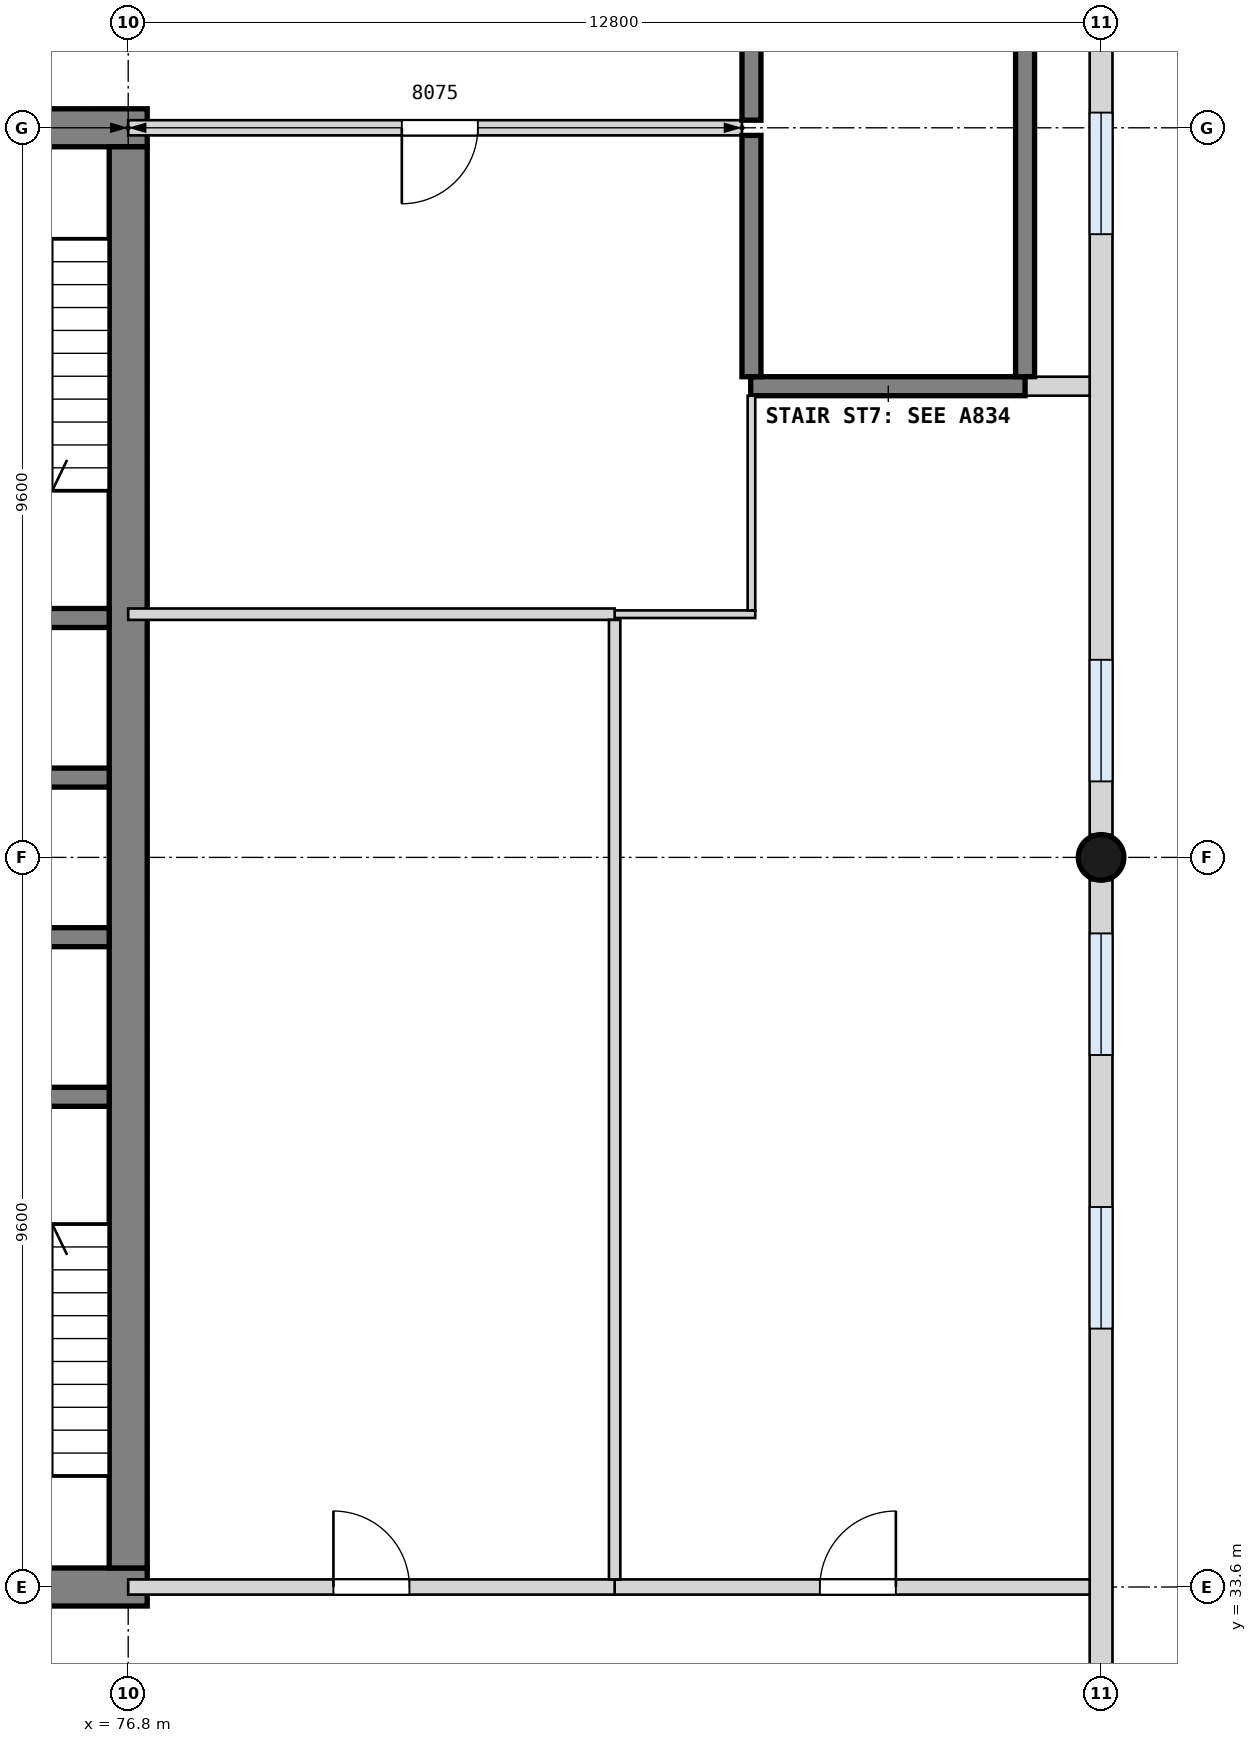
"""IFC4 building model, lengths in metres.
Left out: names, types, materials, properties, quantities, classifications, styles, units other than length and angle.
Written with IfcOpenShell. Run it as: python <this file> out.ifc"""

import sys

from ifc_helpers import new_model, si_unit, direction, frame, frame_2d, origin, origin_2d, place, context, subcontext, project, spatial, rectangle, circle, extrude, element, fill, save


model = new_model("IFC4")
c1 = context("Model", 3, precision=1e-05, world=origin(), true_north=direction((0.0, 1.0)))
c2 = subcontext(c1, "Body", "Model", "MODEL_VIEW")
j1 = project(units=[si_unit("LENGTHUNIT", "METRE"), si_unit("PLANEANGLEUNIT", "RADIAN")], contexts=[c1])
p1 = place(None, origin())
s1 = spatial("IfcSite", under=j1, at=p1, CompositionType="ELEMENT")
p2 = place(p1, origin())
s2 = spatial("IfcBuilding", under=s1, at=p2, CompositionType="ELEMENT")
p3 = place(p2, frame((0.0, 0.0, 4.2)))
s3 = spatial("IfcBuildingStorey", under=s2, at=p3, CompositionType="ELEMENT", Elevation=4.2)
p4 = place(p3, frame((63.75, 52.8, 0.0), z_axis=(0.0, 0.0, 1.0), x_axis=(1.0, 0.0, 0.0)))
e1 = element("IfcWall", 1, at=p4, inside=s3, PredefinedType="SHEAR", context=c2, shape_type="SweptSolid", body=[
    extrude(rectangle(XDim=13.3, YDim=0.5, at=frame_2d((6.65, 0.0))), origin(), (0.0, 0.0, 1.0), 4.2),
])
p5 = place(p4, frame((6.65, 0.0, 0.0)))
e2 = element("IfcOpeningElement", 2, at=p5, cuts=e1, PredefinedType="OPENING", context=c2, shape_type="SweptSolid", body=[
    extrude(rectangle(XDim=2.0, YDim=2.1, at=frame_2d((1.0, 1.05))), frame((0.0, 0.26, 0.0), z_axis=(0.0, -1.0, 0.0), x_axis=(1.0, 0.0, 0.0)), (0.0, 0.0, 1.0), 0.52),
])
p6 = place(p3, frame((63.75, 33.6, 0.0), z_axis=(0.0, 0.0, 1.0), x_axis=(1.0, 0.0, 0.0)))
e3 = element("IfcWall", 3, at=p6, inside=s3, PredefinedType="SHEAR", context=c2, shape_type="SweptSolid", body=[
    extrude(rectangle(XDim=13.3, YDim=0.5, at=frame_2d((6.65, 0.0))), origin(), (0.0, 0.0, 1.0), 4.2),
])
p7 = place(p6, frame((6.65, 0.0, 0.0)))
e4 = element("IfcOpeningElement", 4, at=p7, cuts=e3, PredefinedType="OPENING", context=c2, shape_type="SweptSolid", body=[
    extrude(rectangle(XDim=2.0, YDim=2.1, at=frame_2d((1.0, 1.05))), frame((0.0, 0.26, 0.0), z_axis=(0.0, -1.0, 0.0), x_axis=(1.0, 0.0, 0.0)), (0.0, 0.0, 1.0), 0.52),
])
p8 = place(p3, frame((76.8, 33.85, 0.0), z_axis=(0.0, 0.0, 1.0), x_axis=(0.0, 1.0, 0.0)))
e5 = element("IfcWall", 5, at=p8, inside=s3, PredefinedType="SHEAR", context=c2, shape_type="SweptSolid", body=[
    extrude(rectangle(XDim=18.7, YDim=0.5, at=frame_2d((9.35, 0.0))), origin(), (0.0, 0.0, 1.0), 4.2),
])
p9 = place(p3, frame((89.6, 43.2, 0.0), z_axis=(0.0, 0.0, 1.0), x_axis=(1.0, 0.0, 0.0)))
e6 = element("IfcColumn", 6, at=p9, inside=s3, PredefinedType="COLUMN", context=c2, shape_type="SweptSolid", body=[
    extrude(circle(Radius=0.3, at=origin_2d()), origin(), (0.0, 0.0, 1.0), 4.2),
])
p10 = place(p3, frame((89.6, 29.1, 0.0), z_axis=(0.0, 0.0, 1.0), x_axis=(0.0, 1.0, 0.0)))
e7 = element("IfcWall", 7, at=p10, inside=s3, PredefinedType="SOLIDWALL", context=c2, shape_type="SweptSolid", body=[
    extrude(rectangle(XDim=13.8, YDim=0.3, at=frame_2d((6.9, 0.0))), origin(), (0.0, 0.0, 1.0), 2.9),
])
p11 = place(p10, frame((0.7, 0.0, 1.0)))
e8 = element("IfcOpeningElement", 8, at=p11, cuts=e7, PredefinedType="OPENING", context=c2, shape_type="SweptSolid", body=[
    extrude(rectangle(XDim=1.6, YDim=1.8, at=frame_2d((0.8, 0.9))), frame((0.0, 0.16, 0.0), z_axis=(0.0, -1.0, 0.0), x_axis=(1.0, 0.0, 0.0)), (0.0, 0.0, 1.0), 0.32),
])
p12 = place(p10, frame((7.9, 0.0, 1.0)))
e9 = element("IfcOpeningElement", 9, at=p12, cuts=e7, PredefinedType="OPENING", context=c2, shape_type="SweptSolid", body=[
    extrude(rectangle(XDim=1.6, YDim=1.8, at=frame_2d((0.8, 0.9))), frame((0.0, 0.16, 0.0), z_axis=(0.0, -1.0, 0.0), x_axis=(1.0, 0.0, 0.0)), (0.0, 0.0, 1.0), 0.32),
])
p13 = place(p10, frame((11.5, 0.0, 1.0)))
e10 = element("IfcOpeningElement", 10, at=p13, cuts=e7, PredefinedType="OPENING", context=c2, shape_type="SweptSolid", body=[
    extrude(rectangle(XDim=1.6, YDim=1.8, at=frame_2d((0.8, 0.9))), frame((0.0, 0.16, 0.0), z_axis=(0.0, -1.0, 0.0), x_axis=(1.0, 0.0, 0.0)), (0.0, 0.0, 1.0), 0.32),
])
p14 = place(p3, frame((89.6, 43.5, 0.0), z_axis=(0.0, 0.0, 1.0), x_axis=(0.0, 1.0, 0.0)))
e11 = element("IfcWall", 11, at=p14, inside=s3, PredefinedType="SOLIDWALL", context=c2, shape_type="SweptSolid", body=[
    extrude(rectangle(XDim=13.8, YDim=0.3, at=frame_2d((6.9, 0.0))), origin(), (0.0, 0.0, 1.0), 2.9),
])
p15 = place(p14, frame((0.7, 0.0, 1.0)))
e12 = element("IfcOpeningElement", 12, at=p15, cuts=e11, PredefinedType="OPENING", context=c2, shape_type="SweptSolid", body=[
    extrude(rectangle(XDim=1.6, YDim=1.8, at=frame_2d((0.8, 0.9))), frame((0.0, 0.16, 0.0), z_axis=(0.0, -1.0, 0.0), x_axis=(1.0, 0.0, 0.0)), (0.0, 0.0, 1.0), 0.32),
])
p16 = place(p14, frame((7.9, 0.0, 1.0)))
e13 = element("IfcOpeningElement", 13, at=p16, cuts=e11, PredefinedType="OPENING", context=c2, shape_type="SweptSolid", body=[
    extrude(rectangle(XDim=1.6, YDim=1.8, at=frame_2d((0.8, 0.9))), frame((0.0, 0.16, 0.0), z_axis=(0.0, -1.0, 0.0), x_axis=(1.0, 0.0, 0.0)), (0.0, 0.0, 1.0), 0.32),
])
p17 = place(p14, frame((11.5, 0.0, 1.0)))
e14 = element("IfcOpeningElement", 14, at=p17, cuts=e11, PredefinedType="OPENING", context=c2, shape_type="SweptSolid", body=[
    extrude(rectangle(XDim=1.6, YDim=1.8, at=frame_2d((0.8, 0.9))), frame((0.0, 0.16, 0.0), z_axis=(0.0, -1.0, 0.0), x_axis=(1.0, 0.0, 0.0)), (0.0, 0.0, 1.0), 0.32),
])
for number, where, z_axis, x_axis in (
    (15, (76.55, 40.05, 0.0), (0.0, 0.0, 1.0), (-1.0, 0.0, 0.0)),
    (16, (76.55, 42.15, 0.0), (0.0, 0.0, 1.0), (-1.0, 0.0, 0.0)),
    (17, (76.55, 44.25, 0.0), (0.0, 0.0, 1.0), (-1.0, 0.0, 0.0)),
    (18, (76.55, 46.35, 0.0), (0.0, 0.0, 1.0), (-1.0, 0.0, 0.0)),
):
    element("IfcWall", number, at=place(p3, frame(where, z_axis=z_axis, x_axis=x_axis)), inside=s3, PredefinedType="SOLIDWALL", context=c2, shape_type="SweptSolid", body=[
        extrude(rectangle(XDim=3.475, YDim=0.25, at=frame_2d((1.738, 0.0))), origin(), (0.0, 0.0, 1.0), 3.9),
    ])
p18 = place(p3, frame((89.45, 33.6, 0.0), z_axis=(0.0, 0.0, 1.0), x_axis=(-1.0, 0.0, 0.0)))
e19 = element("IfcWall", 19, at=p18, inside=s3, PredefinedType="PARTITIONING", context=c2, shape_type="SweptSolid", body=[
    extrude(rectangle(XDim=6.25, YDim=0.2, at=frame_2d((3.125, 0.0))), origin(), (0.0, 0.0, 1.0), 3.9),
])
p19 = place(p18, frame((2.55, 0.0, 0.0)))
e20 = element("IfcOpeningElement", 20, at=p19, cuts=e19, PredefinedType="OPENING", context=c2, shape_type="SweptSolid", body=[
    extrude(rectangle(XDim=1.0, YDim=2.1, at=frame_2d((0.5, 1.05))), frame((0.0, 0.11, 0.0), z_axis=(0.0, -1.0, 0.0), x_axis=(1.0, 0.0, 0.0)), (0.0, 0.0, 1.0), 0.22),
])
p20 = place(p3, frame((83.2, 33.6, 0.0), z_axis=(0.0, 0.0, 1.0), x_axis=(-1.0, 0.0, 0.0)))
e21 = element("IfcWall", 21, at=p20, inside=s3, PredefinedType="PARTITIONING", context=c2, shape_type="SweptSolid", body=[
    extrude(rectangle(XDim=6.4, YDim=0.2, at=frame_2d((3.2, 0.0))), origin(), (0.0, 0.0, 1.0), 3.9),
])
p21 = place(p20, frame((2.7, 0.0, 0.0)))
e22 = element("IfcOpeningElement", 22, at=p21, cuts=e21, PredefinedType="OPENING", context=c2, shape_type="SweptSolid", body=[
    extrude(rectangle(XDim=1.0, YDim=2.1, at=frame_2d((0.5, 1.05))), frame((0.0, 0.11, 0.0), z_axis=(0.0, -1.0, 0.0), x_axis=(1.0, 0.0, 0.0)), (0.0, 0.0, 1.0), 0.22),
])
p22 = place(p3, frame((85.05, 46.4, 0.0), z_axis=(0.0, 0.0, 1.0), x_axis=(-1.0, 0.0, 0.0)))
e23 = element("IfcWall", 23, at=p22, inside=s3, PredefinedType="PARTITIONING", context=c2, shape_type="SweptSolid", body=[
    extrude(rectangle(XDim=1.85, YDim=0.1, at=frame_2d((0.925, 0.0))), origin(), (0.0, 0.0, 1.0), 3.9),
])
p23 = place(p3, frame((83.2, 46.4, 0.0), z_axis=(0.0, 0.0, 1.0), x_axis=(-1.0, 0.0, 0.0)))
e24 = element("IfcWall", 24, at=p23, inside=s3, PredefinedType="PARTITIONING", context=c2, shape_type="SweptSolid", body=[
    extrude(rectangle(XDim=6.4, YDim=0.15, at=frame_2d((3.2, 0.0))), origin(), (0.0, 0.0, 1.0), 3.9),
])
p24 = place(p3, frame((89.45, 49.4, 0.0), z_axis=(0.0, 0.0, 1.0), x_axis=(-1.0, 0.0, 0.0)))
e25 = element("IfcWall", 25, at=p24, inside=s3, PredefinedType="PARTITIONING", context=c2, shape_type="SweptSolid", body=[
    extrude(rectangle(XDim=0.85, YDim=0.25, at=frame_2d((0.425, 0.0))), origin(), (0.0, 0.0, 1.0), 3.9),
])
p25 = place(p3, frame((88.6, 49.4, 0.0), z_axis=(0.0, 0.0, 1.0), x_axis=(-1.0, 0.0, 0.0)))
e26 = element("IfcWall", 26, at=p25, inside=s3, PredefinedType="SHEAR", context=c2, shape_type="SweptSolid", body=[
    extrude(rectangle(XDim=3.61, YDim=0.25, at=frame_2d((1.805, 0.0))), origin(), (0.0, 0.0, 1.0), 3.9),
])
p26 = place(p3, frame((84.875, 52.8, 0.0), z_axis=(0.0, 0.0, 1.0), x_axis=(-1.0, 0.0, 0.0)))
e27 = element("IfcWall", 27, at=p26, inside=s3, PredefinedType="PARTITIONING", context=c2, shape_type="SweptSolid", body=[
    extrude(rectangle(XDim=8.075, YDim=0.2, at=frame_2d((4.038, 0.0))), origin(), (0.0, 0.0, 1.0), 3.9),
])
p27 = place(p26, frame((3.475, 0.0, 0.0)))
e28 = element("IfcOpeningElement", 28, at=p27, cuts=e27, PredefinedType="OPENING", context=c2, shape_type="SweptSolid", body=[
    extrude(rectangle(XDim=1.0, YDim=2.1, at=frame_2d((0.5, 1.05))), frame((0.0, 0.11, 0.0), z_axis=(0.0, -1.0, 0.0), x_axis=(1.0, 0.0, 0.0)), (0.0, 0.0, 1.0), 0.22),
])
p28 = place(p3, frame((88.6, 49.525, 0.0), z_axis=(0.0, 0.0, 1.0), x_axis=(0.0, 1.0, 0.0)))
e29 = element("IfcWall", 29, at=p28, inside=s3, PredefinedType="SHEAR", context=c2, shape_type="SweptSolid", body=[
    extrude(rectangle(XDim=5.75, YDim=0.25, at=frame_2d((2.875, 0.0))), origin(), (0.0, 0.0, 1.0), 3.9),
])
p29 = place(p3, frame((85.0, 46.45, 0.0), z_axis=(0.0, 0.0, 1.0), x_axis=(0.0, 1.0, 0.0)))
e30 = element("IfcWall", 30, at=p29, inside=s3, PredefinedType="PARTITIONING", context=c2, shape_type="SweptSolid", body=[
    extrude(rectangle(XDim=2.825, YDim=0.1, at=frame_2d((1.413, 0.0))), origin(), (0.0, 0.0, 1.0), 3.9),
])
p30 = place(p3, frame((85.0, 49.525, 0.0), z_axis=(0.0, 0.0, 1.0), x_axis=(0.0, 1.0, 0.0)))
e31 = element("IfcWall", 31, at=p30, inside=s3, PredefinedType="SHEAR", context=c2, shape_type="SweptSolid", body=[
    extrude(rectangle(XDim=3.175, YDim=0.25, at=frame_2d((1.587, 0.0))), origin(), (0.0, 0.0, 1.0), 3.9),
])
p31 = place(p3, frame((85.0, 52.9, 0.0), z_axis=(0.0, 0.0, 1.0), x_axis=(0.0, 1.0, 0.0)))
e32 = element("IfcWall", 32, at=p31, inside=s3, PredefinedType="SHEAR", context=c2, shape_type="SweptSolid", body=[
    extrude(rectangle(XDim=2.375, YDim=0.25, at=frame_2d((1.188, 0.0))), origin(), (0.0, 0.0, 1.0), 3.9),
])
p32 = place(p31, frame((1.075, 0.0, 0.0)))
e33 = element("IfcOpeningElement", 33, at=p32, cuts=e32, PredefinedType="OPENING", context=c2, shape_type="SweptSolid", body=[
    extrude(rectangle(XDim=1.2, YDim=2.1, at=frame_2d((0.6, 1.05))), frame((0.0, 0.135, 0.0), z_axis=(0.0, -1.0, 0.0), x_axis=(1.0, 0.0, 0.0)), (0.0, 0.0, 1.0), 0.27),
])
p33 = place(p3, frame((83.2, 33.7, 0.0), z_axis=(0.0, 0.0, 1.0), x_axis=(0.0, 1.0, 0.0)))
e34 = element("IfcWall", 34, at=p33, inside=s3, PredefinedType="PARTITIONING", context=c2, shape_type="SweptSolid", body=[
    extrude(rectangle(XDim=12.625, YDim=0.15, at=frame_2d((6.312, 0.0))), origin(), (0.0, 0.0, 1.0), 2.9),
])
p34 = place(p19, frame((1.0, 0.0, 0.0), z_axis=(0.0, 0.0, 1.0), x_axis=(-1.0, 0.0, 0.0)))
e35 = element("IfcDoor", 35, at=p34, inside=s3, OperationType="SINGLE_SWING_RIGHT", PredefinedType="DOOR", context=c2, shape_type="SweptSolid", body=[
    extrude(rectangle(XDim=1.0, YDim=2.1, at=frame_2d((0.5, 1.05))), frame((0.0, 0.025, 0.0), z_axis=(0.0, -1.0, 0.0), x_axis=(1.0, 0.0, 0.0)), (0.0, 0.0, 1.0), 0.05),
])
fill(e20, e35)
p35 = place(p21, frame((1.0, 0.0, 0.0), z_axis=(0.0, 0.0, 1.0), x_axis=(-1.0, 0.0, 0.0)))
e36 = element("IfcDoor", 36, at=p35, inside=s3, OperationType="SINGLE_SWING_LEFT", PredefinedType="DOOR", context=c2, shape_type="SweptSolid", body=[
    extrude(rectangle(XDim=1.0, YDim=2.1, at=frame_2d((0.5, 1.05))), frame((0.0, 0.025, 0.0), z_axis=(0.0, -1.0, 0.0), x_axis=(1.0, 0.0, 0.0)), (0.0, 0.0, 1.0), 0.05),
])
fill(e22, e36)
p36 = place(p27, origin())
e37 = element("IfcDoor", 37, at=p36, inside=s3, OperationType="SINGLE_SWING_RIGHT", PredefinedType="DOOR", context=c2, shape_type="SweptSolid", body=[
    extrude(rectangle(XDim=1.0, YDim=2.1, at=frame_2d((0.5, 1.05))), frame((0.0, 0.025, 0.0), z_axis=(0.0, -1.0, 0.0), x_axis=(1.0, 0.0, 0.0)), (0.0, 0.0, 1.0), 0.05),
])
fill(e28, e37)
p37 = place(p12, origin())
e38 = element("IfcWindow", 38, at=p37, inside=s3, PartitioningType="SINGLE_PANEL", PredefinedType="WINDOW", context=c2, shape_type="SweptSolid", body=[
    extrude(rectangle(XDim=1.6, YDim=1.8, at=frame_2d((0.8, 0.9))), frame((0.0, 0.03, 0.0), z_axis=(0.0, -1.0, 0.0), x_axis=(1.0, 0.0, 0.0)), (0.0, 0.0, 1.0), 0.06),
])
fill(e9, e38)
p38 = place(p13, origin())
e39 = element("IfcWindow", 39, at=p38, inside=s3, PartitioningType="SINGLE_PANEL", PredefinedType="WINDOW", context=c2, shape_type="SweptSolid", body=[
    extrude(rectangle(XDim=1.6, YDim=1.8, at=frame_2d((0.8, 0.9))), frame((0.0, 0.03, 0.0), z_axis=(0.0, -1.0, 0.0), x_axis=(1.0, 0.0, 0.0)), (0.0, 0.0, 1.0), 0.06),
])
fill(e10, e39)
p39 = place(p15, origin())
e40 = element("IfcWindow", 40, at=p39, inside=s3, PartitioningType="SINGLE_PANEL", PredefinedType="WINDOW", context=c2, shape_type="SweptSolid", body=[
    extrude(rectangle(XDim=1.6, YDim=1.8, at=frame_2d((0.8, 0.9))), frame((0.0, 0.03, 0.0), z_axis=(0.0, -1.0, 0.0), x_axis=(1.0, 0.0, 0.0)), (0.0, 0.0, 1.0), 0.06),
])
fill(e12, e40)
p40 = place(p16, origin())
e41 = element("IfcWindow", 41, at=p40, inside=s3, PartitioningType="SINGLE_PANEL", PredefinedType="WINDOW", context=c2, shape_type="SweptSolid", body=[
    extrude(rectangle(XDim=1.6, YDim=1.8, at=frame_2d((0.8, 0.9))), frame((0.0, 0.03, 0.0), z_axis=(0.0, -1.0, 0.0), x_axis=(1.0, 0.0, 0.0)), (0.0, 0.0, 1.0), 0.06),
])
fill(e13, e41)
save(model, sys.argv[1])
